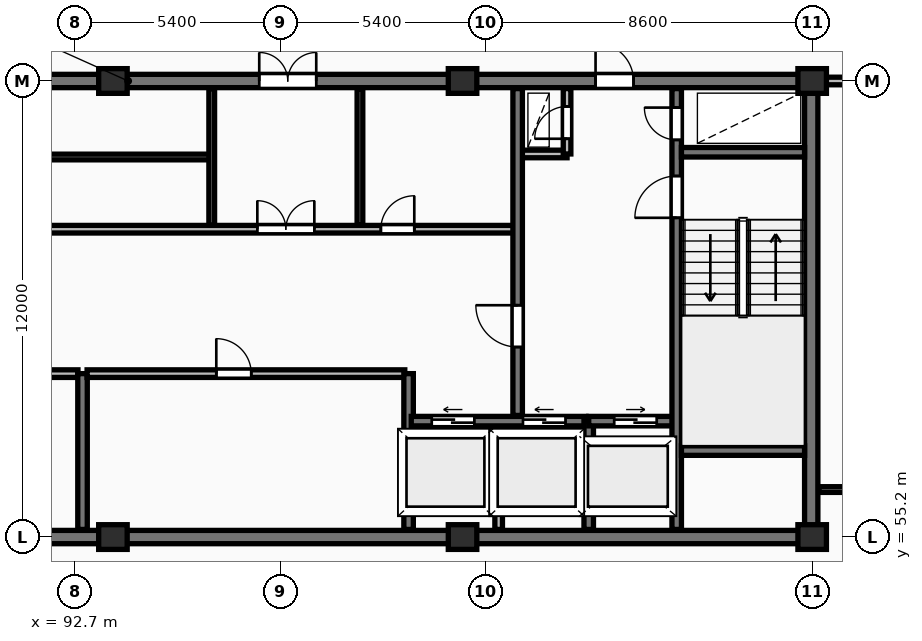
"""IFC4 building model, lengths in metres.
Left out: names, types, materials, properties, quantities, classifications, styles, units other than length and angle.
Written with IfcOpenShell. Run it as: python <this file> out.ifc"""

import sys

from ifc_helpers import new_model, si_unit, direction, frame, frame_2d, origin, origin_2d, place, context, subcontext, project, spatial, rectangle, extrude, element, fill, save


model = new_model("IFC4")
c1 = context("Model", 3, precision=1e-05, world=origin(), true_north=direction((0.0, 1.0)))
c2 = subcontext(c1, "Body", "Model", "MODEL_VIEW")
j1 = project(units=[si_unit("LENGTHUNIT", "METRE"), si_unit("PLANEANGLEUNIT", "RADIAN")], contexts=[c1])
p1 = place(None, origin())
s1 = spatial("IfcSite", under=j1, at=p1, CompositionType="ELEMENT")
p2 = place(p1, origin())
s2 = spatial("IfcBuilding", under=s1, at=p2, CompositionType="ELEMENT")
p3 = place(p2, frame((0.0, 0.0, 256.25)))
s3 = spatial("IfcBuildingStorey", under=s2, at=p3, CompositionType="ELEMENT", Elevation=256.25)
for number, where, z_axis, x_axis in (
    (1, (93.7, 55.2, 0.0), (0.0, 0.0, 1.0), (1.0, 0.0, 0.0)),
    (2, (93.7, 67.2, 0.0), (0.0, 0.0, 1.0), (1.0, 0.0, 0.0)),
    (3, (102.9, 55.2, 0.0), (0.0, 0.0, 1.0), (1.0, 0.0, 0.0)),
    (4, (102.9, 67.2, 0.0), (0.0, 0.0, 1.0), (1.0, 0.0, 0.0)),
    (5, (112.1, 55.2, 0.0), (0.0, 0.0, 1.0), (1.0, 0.0, 0.0)),
    (6, (112.1, 67.2, 0.0), (0.0, 0.0, 1.0), (1.0, 0.0, 0.0)),
):
    element("IfcColumn", number, at=place(p3, frame(where, z_axis=z_axis, x_axis=x_axis)), inside=s3, PredefinedType="COLUMN", context=c2, shape_type="SweptSolid", body=[
        extrude(rectangle(XDim=0.75, YDim=0.65, at=origin_2d()), origin(), (0.0, 0.0, 1.0), 3.45),
    ])
p4 = place(p3, frame((75.95, 55.2, 0.0), z_axis=(0.0, 0.0, 1.0), x_axis=(1.0, 0.0, 0.0)))
e7 = element("IfcWall", 7, at=p4, inside=s3, PredefinedType="SHEAR", context=c2, shape_type="SweptSolid", body=[
    extrude(rectangle(XDim=36.3, YDim=0.35, at=frame_2d((18.15, 0.0))), origin(), (0.0, 0.0, 1.0), 3.45),
])
p5 = place(p3, frame((112.075, 55.375, 0.0), z_axis=(0.0, 0.0, 1.0), x_axis=(0.0, 1.0, 0.0)))
e8 = element("IfcWall", 8, at=p5, inside=s3, PredefinedType="SHEAR", context=c2, shape_type="SweptSolid", body=[
    extrude(rectangle(XDim=11.65, YDim=0.35, at=frame_2d((5.825, 0.0))), origin(), (0.0, 0.0, 1.0), 3.45),
])
p6 = place(p3, frame((75.95, 67.2, 0.0), z_axis=(0.0, 0.0, 1.0), x_axis=(1.0, 0.0, 0.0)))
e9 = element("IfcWall", 9, at=p6, inside=s3, PredefinedType="SHEAR", context=c2, shape_type="SweptSolid", body=[
    extrude(rectangle(XDim=36.3, YDim=0.35, at=frame_2d((18.15, 0.0))), origin(), (0.0, 0.0, 1.0), 3.45),
])
p7 = place(p6, frame((5.25, 0.0, 0.0)))
e10 = element("IfcOpeningElement", 10, at=p7, cuts=e9, PredefinedType="OPENING", context=c2, shape_type="SweptSolid", body=[
    extrude(rectangle(XDim=1.0, YDim=2.15, at=frame_2d((0.5, 1.075))), frame((0.0, 0.185, 0.0), z_axis=(0.0, -1.0, 0.0), x_axis=(1.0, 0.0, 0.0)), (0.0, 0.0, 1.0), 0.37),
])
p8 = place(p6, frame((21.6, 0.0, 0.0)))
e11 = element("IfcOpeningElement", 11, at=p8, cuts=e9, PredefinedType="OPENING", context=c2, shape_type="SweptSolid", body=[
    extrude(rectangle(XDim=1.5, YDim=2.2, at=frame_2d((0.75, 1.1))), frame((0.0, 0.185, 0.0), z_axis=(0.0, -1.0, 0.0), x_axis=(1.0, 0.0, 0.0)), (0.0, 0.0, 1.0), 0.37),
])
p9 = place(p6, frame((30.45, 0.0, 0.0)))
e12 = element("IfcOpeningElement", 12, at=p9, cuts=e9, PredefinedType="OPENING", context=c2, shape_type="SweptSolid", body=[
    extrude(rectangle(XDim=1.0, YDim=2.15, at=frame_2d((0.5, 1.075))), frame((0.0, 0.185, 0.0), z_axis=(0.0, -1.0, 0.0), x_axis=(1.0, 0.0, 0.0)), (0.0, 0.0, 1.0), 0.37),
])
p10 = place(p3, frame((84.42, 59.5, 0.0), z_axis=(0.0, 0.0, 1.0), x_axis=(1.0, 0.0, 0.0)))
e13 = element("IfcWall", 13, at=p10, inside=s3, PredefinedType="PARTITIONING", context=c2, shape_type="SweptSolid", body=[
    extrude(rectangle(XDim=8.36, YDim=0.2, at=frame_2d((4.18, 0.0))), origin(), (0.0, 0.0, 1.0), 3.17),
])
p11 = place(p10, frame((3.4, 0.0, 0.0)))
e14 = element("IfcOpeningElement", 14, at=p11, cuts=e13, PredefinedType="OPENING", context=c2, shape_type="SweptSolid", body=[
    extrude(rectangle(XDim=0.92, YDim=2.08, at=frame_2d((0.46, 1.04))), frame((0.0, 0.11, 0.0), z_axis=(0.0, -1.0, 0.0), x_axis=(1.0, 0.0, 0.0)), (0.0, 0.0, 1.0), 0.22),
])
p12 = place(p3, frame((92.9, 55.4, 0.0), z_axis=(0.0, 0.0, 1.0), x_axis=(0.0, 1.0, 0.0)))
e15 = element("IfcWall", 15, at=p12, inside=s3, PredefinedType="SHEAR", context=c2, shape_type="SweptSolid", body=[
    extrude(rectangle(XDim=4.1, YDim=0.25, at=frame_2d((2.05, 0.0))), origin(), (0.0, 0.0, 1.0), 3.45),
])
p13 = place(p3, frame((93.02, 59.5, 0.0), z_axis=(0.0, 0.0, 1.0), x_axis=(1.0, 0.0, 0.0)))
e16 = element("IfcWall", 16, at=p13, inside=s3, PredefinedType="PARTITIONING", context=c2, shape_type="SweptSolid", body=[
    extrude(rectangle(XDim=8.36, YDim=0.2, at=frame_2d((4.18, 0.0))), origin(), (0.0, 0.0, 1.0), 3.17),
])
p14 = place(p13, frame((3.4, 0.0, 0.0)))
e17 = element("IfcOpeningElement", 17, at=p14, cuts=e16, PredefinedType="OPENING", context=c2, shape_type="SweptSolid", body=[
    extrude(rectangle(XDim=0.92, YDim=2.08, at=frame_2d((0.46, 1.04))), frame((0.0, 0.11, 0.0), z_axis=(0.0, -1.0, 0.0), x_axis=(1.0, 0.0, 0.0)), (0.0, 0.0, 1.0), 0.22),
])
p15 = place(p3, frame((101.48, 55.4, 0.0), z_axis=(0.0, 0.0, 1.0), x_axis=(0.0, 1.0, 0.0)))
e18 = element("IfcWall", 18, at=p15, inside=s3, PredefinedType="SHEAR", context=c2, shape_type="SweptSolid", body=[
    extrude(rectangle(XDim=4.1, YDim=0.25, at=frame_2d((2.05, 0.0))), origin(), (0.0, 0.0, 1.0), 3.45),
])
p16 = place(p3, frame((103.85, 55.4, 0.0), z_axis=(0.0, 0.0, 1.0), x_axis=(0.0, 1.0, 0.0)))
e19 = element("IfcWall", 19, at=p16, inside=s3, PredefinedType="PARTITIONING", context=c2, shape_type="SweptSolid", body=[
    extrude(rectangle(XDim=2.72, YDim=0.2, at=frame_2d((1.36, 0.0))), origin(), (0.0, 0.0, 1.0), 3.17),
])
p17 = place(p3, frame((101.55, 58.25, 0.0), z_axis=(0.0, 0.0, 1.0), x_axis=(1.0, 0.0, 0.0)))
e20 = element("IfcWall", 20, at=p17, inside=s3, PredefinedType="SHEAR", context=c2, shape_type="SweptSolid", body=[
    extrude(rectangle(XDim=4.6, YDim=0.25, at=frame_2d((2.3, 0.0))), origin(), (0.0, 0.0, 1.0), 3.45),
])
p18 = place(p17, frame((0.54, 0.0, 0.0)))
e21 = element("IfcOpeningElement", 21, at=p18, cuts=e20, PredefinedType="OPENING", context=c2, shape_type="SweptSolid", body=[
    extrude(rectangle(XDim=1.12, YDim=2.12, at=frame_2d((0.56, 1.06))), frame((0.0, 0.135, 0.0), z_axis=(0.0, -1.0, 0.0), x_axis=(1.0, 0.0, 0.0)), (0.0, 0.0, 1.0), 0.27),
])
p19 = place(p17, frame((2.94, 0.0, 0.0)))
e22 = element("IfcOpeningElement", 22, at=p19, cuts=e20, PredefinedType="OPENING", context=c2, shape_type="SweptSolid", body=[
    extrude(rectangle(XDim=1.12, YDim=2.12, at=frame_2d((0.56, 1.06))), frame((0.0, 0.135, 0.0), z_axis=(0.0, -1.0, 0.0), x_axis=(1.0, 0.0, 0.0)), (0.0, 0.0, 1.0), 0.27),
])
p20 = place(p3, frame((106.22, 55.4, 0.0), z_axis=(0.0, 0.0, 1.0), x_axis=(0.0, 1.0, 0.0)))
e23 = element("IfcWall", 23, at=p20, inside=s3, PredefinedType="SHEAR", context=c2, shape_type="SweptSolid", body=[
    extrude(rectangle(XDim=2.85, YDim=0.25, at=frame_2d((1.425, 0.0))), origin(), (0.0, 0.0, 1.0), 3.45),
])
p21 = place(p3, frame((106.22, 58.25, 0.0), z_axis=(0.0, 0.0, 1.0), x_axis=(1.0, 0.0, 0.0)))
e24 = element("IfcWall", 24, at=p21, inside=s3, PredefinedType="SHEAR", context=c2, shape_type="SweptSolid", body=[
    extrude(rectangle(XDim=2.46, YDim=0.25, at=frame_2d((1.23, 0.0))), origin(), (0.0, 0.0, 1.0), 3.45),
])
p22 = place(p21, frame((0.67, 0.0, 0.0)))
e25 = element("IfcOpeningElement", 25, at=p22, cuts=e24, PredefinedType="OPENING", context=c2, shape_type="SweptSolid", body=[
    extrude(rectangle(XDim=1.12, YDim=2.12, at=frame_2d((0.56, 1.06))), frame((0.0, 0.135, 0.0), z_axis=(0.0, -1.0, 0.0), x_axis=(1.0, 0.0, 0.0)), (0.0, 0.0, 1.0), 0.27),
])
p23 = place(p3, frame((89.25, 65.2, 0.0), z_axis=(0.0, 0.0, 1.0), x_axis=(1.0, 0.0, 0.0)))
e26 = element("IfcWall", 26, at=p23, inside=s3, PredefinedType="PARTITIONING", context=c2, shape_type="SweptSolid", body=[
    extrude(rectangle(XDim=7.05, YDim=0.15, at=frame_2d((3.525, 0.0))), origin(), (0.0, 0.0, 1.0), 3.17),
])
p24 = place(p23, frame((1.6, 0.0, 0.0)))
e27 = element("IfcOpeningElement", 27, at=p24, cuts=e26, PredefinedType="OPENING", context=c2, shape_type="SweptSolid", body=[
    extrude(rectangle(XDim=0.88, YDim=2.06, at=frame_2d((0.44, 1.03))), frame((0.0, 0.085, 0.0), z_axis=(0.0, -1.0, 0.0), x_axis=(1.0, 0.0, 0.0)), (0.0, 0.0, 1.0), 0.17),
])
for number, where, z_axis, x_axis in (
    (28, (96.3, 63.4, 0.0), (0.0, 0.0, 1.0), (0.0, 1.0, 0.0)),
    (29, (100.2, 63.4, 0.0), (0.0, 0.0, 1.0), (0.0, 1.0, 0.0)),
):
    element("IfcWall", number, at=place(p3, frame(where, z_axis=z_axis, x_axis=x_axis)), inside=s3, PredefinedType="PARTITIONING", context=c2, shape_type="SweptSolid", body=[
        extrude(rectangle(XDim=3.6, YDim=0.15, at=frame_2d((1.8, 0.0))), origin(), (0.0, 0.0, 1.0), 3.17),
    ])
p25 = place(p3, frame((84.42, 63.3, 0.0), z_axis=(0.0, 0.0, 1.0), x_axis=(1.0, 0.0, 0.0)))
e30 = element("IfcWall", 30, at=p25, inside=s3, PredefinedType="PARTITIONING", context=c2, shape_type="SweptSolid", body=[
    extrude(rectangle(XDim=19.83, YDim=0.2, at=frame_2d((9.915, 0.0))), origin(), (0.0, 0.0, 1.0), 3.17),
])
p26 = place(p25, frame((1.15, 0.0, 0.0)))
e31 = element("IfcOpeningElement", 31, at=p26, cuts=e30, PredefinedType="OPENING", context=c2, shape_type="SweptSolid", body=[
    extrude(rectangle(XDim=0.85, YDim=2.05, at=frame_2d((0.425, 1.025))), frame((0.0, 0.11, 0.0), z_axis=(0.0, -1.0, 0.0), x_axis=(1.0, 0.0, 0.0)), (0.0, 0.0, 1.0), 0.22),
])
p27 = place(p25, frame((3.25, 0.0, 0.0)))
e32 = element("IfcOpeningElement", 32, at=p27, cuts=e30, PredefinedType="OPENING", context=c2, shape_type="SweptSolid", body=[
    extrude(rectangle(XDim=0.85, YDim=2.05, at=frame_2d((0.425, 1.025))), frame((0.0, 0.11, 0.0), z_axis=(0.0, -1.0, 0.0), x_axis=(1.0, 0.0, 0.0)), (0.0, 0.0, 1.0), 0.22),
])
p28 = place(p25, frame((13.08, 0.0, 0.0)))
e33 = element("IfcOpeningElement", 33, at=p28, cuts=e30, PredefinedType="OPENING", context=c2, shape_type="SweptSolid", body=[
    extrude(rectangle(XDim=1.5, YDim=2.2, at=frame_2d((0.75, 1.1))), frame((0.0, 0.11, 0.0), z_axis=(0.0, -1.0, 0.0), x_axis=(1.0, 0.0, 0.0)), (0.0, 0.0, 1.0), 0.22),
])
p29 = place(p25, frame((6.68, 0.0, 0.0)))
e34 = element("IfcOpeningElement", 34, at=p29, cuts=e30, PredefinedType="OPENING", context=c2, shape_type="SweptSolid", body=[
    extrude(rectangle(XDim=0.92, YDim=2.08, at=frame_2d((0.46, 1.04))), frame((0.0, 0.11, 0.0), z_axis=(0.0, -1.0, 0.0), x_axis=(1.0, 0.0, 0.0)), (0.0, 0.0, 1.0), 0.22),
])
p30 = place(p25, frame((16.33, 0.0, 0.0)))
e35 = element("IfcOpeningElement", 35, at=p30, cuts=e30, PredefinedType="OPENING", context=c2, shape_type="SweptSolid", body=[
    extrude(rectangle(XDim=0.88, YDim=2.06, at=frame_2d((0.44, 1.03))), frame((0.0, 0.11, 0.0), z_axis=(0.0, -1.0, 0.0), x_axis=(1.0, 0.0, 0.0)), (0.0, 0.0, 1.0), 0.22),
])
p31 = place(p3, frame((104.45, 65.28, 0.0), z_axis=(0.0, 0.0, 1.0), x_axis=(1.0, 0.0, 0.0)))
e36 = element("IfcWall", 36, at=p31, inside=s3, PredefinedType="PARTITIONING", context=c2, shape_type="SweptSolid", body=[
    extrude(rectangle(XDim=1.2, YDim=0.2, at=frame_2d((0.6, 0.0))), origin(), (0.0, 0.0, 1.0), 3.17),
])
p32 = place(p3, frame((105.65, 65.28, 0.0), z_axis=(0.0, 0.0, 1.0), x_axis=(0.0, 1.0, 0.0)))
e37 = element("IfcWall", 37, at=p32, inside=s3, PredefinedType="PARTITIONING", context=c2, shape_type="SweptSolid", body=[
    extrude(rectangle(XDim=1.72, YDim=0.2, at=frame_2d((0.86, 0.0))), origin(), (0.0, 0.0, 1.0), 3.17),
])
p33 = place(p32, frame((0.4, 0.0, 0.0)))
e38 = element("IfcOpeningElement", 38, at=p33, cuts=e37, PredefinedType="OPENING", context=c2, shape_type="SweptSolid", body=[
    extrude(rectangle(XDim=0.85, YDim=2.05, at=frame_2d((0.425, 1.025))), frame((0.0, 0.11, 0.0), z_axis=(0.0, -1.0, 0.0), x_axis=(1.0, 0.0, 0.0)), (0.0, 0.0, 1.0), 0.22),
])
p34 = place(p3, frame((104.35, 58.4, 0.0), z_axis=(0.0, 0.0, 1.0), x_axis=(0.0, 1.0, 0.0)))
e39 = element("IfcWall", 39, at=p34, inside=s3, PredefinedType="SHEAR", context=c2, shape_type="SweptSolid", body=[
    extrude(rectangle(XDim=8.6, YDim=0.25, at=frame_2d((4.3, 0.0))), origin(), (0.0, 0.0, 1.0), 3.45),
])
p35 = place(p34, frame((1.8, 0.0, 0.0)))
e40 = element("IfcOpeningElement", 40, at=p35, cuts=e39, PredefinedType="OPENING", context=c2, shape_type="SweptSolid", body=[
    extrude(rectangle(XDim=1.1, YDim=2.1, at=frame_2d((0.55, 1.05))), frame((0.0, 0.135, 0.0), z_axis=(0.0, -1.0, 0.0), x_axis=(1.0, 0.0, 0.0)), (0.0, 0.0, 1.0), 0.27),
])
p36 = place(p3, frame((108.535, 55.4, 0.0), z_axis=(0.0, 0.0, 1.0), x_axis=(0.0, 1.0, 0.0)))
e41 = element("IfcWall", 41, at=p36, inside=s3, PredefinedType="SHEAR", context=c2, shape_type="SweptSolid", body=[
    extrude(rectangle(XDim=11.6, YDim=0.25, at=frame_2d((5.8, 0.0))), origin(), (0.0, 0.0, 1.0), 3.45),
])
p37 = place(p36, frame((8.2, 0.0, 0.0)))
e42 = element("IfcOpeningElement", 42, at=p37, cuts=e41, PredefinedType="OPENING", context=c2, shape_type="SweptSolid", body=[
    extrude(rectangle(XDim=1.1, YDim=2.1, at=frame_2d((0.55, 1.05))), frame((0.0, 0.135, 0.0), z_axis=(0.0, -1.0, 0.0), x_axis=(1.0, 0.0, 0.0)), (0.0, 0.0, 1.0), 0.27),
])
p38 = place(p36, frame((10.25, 0.0, 0.0)))
e43 = element("IfcOpeningElement", 43, at=p38, cuts=e41, PredefinedType="OPENING", context=c2, shape_type="SweptSolid", body=[
    extrude(rectangle(XDim=0.85, YDim=2.05, at=frame_2d((0.425, 1.025))), frame((0.0, 0.135, 0.0), z_axis=(0.0, -1.0, 0.0), x_axis=(1.0, 0.0, 0.0)), (0.0, 0.0, 1.0), 0.27),
])
for number, where, z_axis, x_axis in (
    (44, (108.66, 57.475, 0.0), (0.0, 0.0, 1.0), (1.0, 0.0, 0.0)),
    (45, (108.66, 65.325, 0.0), (0.0, 0.0, 1.0), (1.0, 0.0, 0.0)),
):
    element("IfcWall", number, at=place(p3, frame(where, z_axis=z_axis, x_axis=x_axis)), inside=s3, PredefinedType="SHEAR", context=c2, shape_type="SweptSolid", body=[
        extrude(rectangle(XDim=3.24, YDim=0.25, at=frame_2d((1.62, 0.0))), origin(), (0.0, 0.0, 1.0), 3.45),
    ])
p39 = place(p3, frame((112.27, 56.45, 0.0), z_axis=(0.0, 0.0, 1.0), x_axis=(1.0, 0.0, 0.0)))
e46 = element("IfcWall", 46, at=p39, inside=s3, PredefinedType="PARTITIONING", context=c2, shape_type="SweptSolid", body=[
    extrude(rectangle(XDim=6.76, YDim=0.15, at=frame_2d((3.38, 0.0))), origin(), (0.0, 0.0, 1.0), 3.17),
])
p40 = place(p39, frame((1.64, 0.0, 0.0)))
e47 = element("IfcOpeningElement", 47, at=p40, cuts=e46, PredefinedType="OPENING", context=c2, shape_type="SweptSolid", body=[
    extrude(rectangle(XDim=0.84, YDim=2.04, at=frame_2d((0.42, 1.02))), frame((0.0, 0.085, 0.0), z_axis=(0.0, -1.0, 0.0), x_axis=(1.0, 0.0, 0.0)), (0.0, 0.0, 1.0), 0.17),
])
p41 = place(p39, frame((3.16, 0.0, 0.0)))
e48 = element("IfcOpeningElement", 48, at=p41, cuts=e46, PredefinedType="OPENING", context=c2, shape_type="SweptSolid", body=[
    extrude(rectangle(XDim=0.88, YDim=2.06, at=frame_2d((0.44, 1.03))), frame((0.0, 0.085, 0.0), z_axis=(0.0, -1.0, 0.0), x_axis=(1.0, 0.0, 0.0)), (0.0, 0.0, 1.0), 0.17),
])
p42 = place(p3, frame((112.25, 67.2, 0.0), z_axis=(0.0, 0.0, 1.0), x_axis=(1.0, 0.0, 0.0)))
e49 = element("IfcWall", 49, at=p42, inside=s3, PredefinedType="PARTITIONING", context=c2, shape_type="SweptSolid", body=[
    extrude(rectangle(XDim=16.15, YDim=0.2, at=frame_2d((8.075, 0.0))), origin(), (0.0, 0.0, 1.0), 2.633),
])
p43 = place(p42, frame((1.58, 0.0, 0.0)))
e50 = element("IfcOpeningElement", 50, at=p43, cuts=e49, PredefinedType="OPENING", context=c2, shape_type="SweptSolid", body=[
    extrude(rectangle(XDim=0.95, YDim=2.15, at=frame_2d((0.475, 1.075))), frame((0.0, 0.11, 0.0), z_axis=(0.0, -1.0, 0.0), x_axis=(1.0, 0.0, 0.0)), (0.0, 0.0, 1.0), 0.22),
])
p44 = place(p8, origin())
e51 = element("IfcDoor", 51, at=p44, inside=s3, OperationType="DOUBLE_DOOR_SINGLE_SWING", PredefinedType="DOOR", context=c2, shape_type="SweptSolid", body=[
    extrude(rectangle(XDim=1.5, YDim=2.2, at=frame_2d((0.75, 1.1))), frame((0.0, 0.025, 0.0), z_axis=(0.0, -1.0, 0.0), x_axis=(1.0, 0.0, 0.0)), (0.0, 0.0, 1.0), 0.05),
])
fill(e11, e51)
p45 = place(p9, origin())
e52 = element("IfcDoor", 52, at=p45, inside=s3, OperationType="SINGLE_SWING_LEFT", PredefinedType="DOOR", context=c2, shape_type="SweptSolid", body=[
    extrude(rectangle(XDim=1.0, YDim=2.15, at=frame_2d((0.5, 1.075))), frame((0.0, 0.025, 0.0), z_axis=(0.0, -1.0, 0.0), x_axis=(1.0, 0.0, 0.0)), (0.0, 0.0, 1.0), 0.05),
])
fill(e12, e52)
p46 = place(p14, origin())
e53 = element("IfcDoor", 53, at=p46, inside=s3, OperationType="SINGLE_SWING_LEFT", PredefinedType="DOOR", context=c2, shape_type="SweptSolid", body=[
    extrude(rectangle(XDim=0.92, YDim=2.08, at=frame_2d((0.46, 1.04))), frame((0.0, 0.025, 0.0), z_axis=(0.0, -1.0, 0.0), x_axis=(1.0, 0.0, 0.0)), (0.0, 0.0, 1.0), 0.05),
])
fill(e17, e53)
p47 = place(p18, origin())
e54 = element("IfcDoor", 54, at=p47, inside=s3, OperationType="SLIDING_TO_LEFT", PredefinedType="DOOR", context=c2, shape_type="SweptSolid", body=[
    extrude(rectangle(XDim=1.12, YDim=2.12, at=frame_2d((0.56, 1.06))), frame((0.0, 0.025, 0.0), z_axis=(0.0, -1.0, 0.0), x_axis=(1.0, 0.0, 0.0)), (0.0, 0.0, 1.0), 0.05),
])
fill(e21, e54)
p48 = place(p19, origin())
e55 = element("IfcDoor", 55, at=p48, inside=s3, OperationType="SLIDING_TO_LEFT", PredefinedType="DOOR", context=c2, shape_type="SweptSolid", body=[
    extrude(rectangle(XDim=1.12, YDim=2.12, at=frame_2d((0.56, 1.06))), frame((0.0, 0.025, 0.0), z_axis=(0.0, -1.0, 0.0), x_axis=(1.0, 0.0, 0.0)), (0.0, 0.0, 1.0), 0.05),
])
fill(e22, e55)
p49 = place(p22, origin())
e56 = element("IfcDoor", 56, at=p49, inside=s3, OperationType="SLIDING_TO_RIGHT", PredefinedType="DOOR", context=c2, shape_type="SweptSolid", body=[
    extrude(rectangle(XDim=1.12, YDim=2.12, at=frame_2d((0.56, 1.06))), frame((0.0, 0.025, 0.0), z_axis=(0.0, -1.0, 0.0), x_axis=(1.0, 0.0, 0.0)), (0.0, 0.0, 1.0), 0.05),
])
fill(e25, e56)
p50 = place(p28, origin())
e57 = element("IfcDoor", 57, at=p50, inside=s3, OperationType="DOUBLE_DOOR_SINGLE_SWING", PredefinedType="DOOR", context=c2, shape_type="SweptSolid", body=[
    extrude(rectangle(XDim=1.5, YDim=2.2, at=frame_2d((0.75, 1.1))), frame((0.0, 0.025, 0.0), z_axis=(0.0, -1.0, 0.0), x_axis=(1.0, 0.0, 0.0)), (0.0, 0.0, 1.0), 0.05),
])
fill(e33, e57)
p51 = place(p30, origin())
e58 = element("IfcDoor", 58, at=p51, inside=s3, OperationType="SINGLE_SWING_RIGHT", PredefinedType="DOOR", context=c2, shape_type="SweptSolid", body=[
    extrude(rectangle(XDim=0.88, YDim=2.06, at=frame_2d((0.44, 1.03))), frame((0.0, 0.025, 0.0), z_axis=(0.0, -1.0, 0.0), x_axis=(1.0, 0.0, 0.0)), (0.0, 0.0, 1.0), 0.05),
])
fill(e35, e58)
p52 = place(p33, origin())
e59 = element("IfcDoor", 59, at=p52, inside=s3, OperationType="SINGLE_SWING_LEFT", PredefinedType="DOOR", context=c2, shape_type="SweptSolid", body=[
    extrude(rectangle(XDim=0.85, YDim=2.05, at=frame_2d((0.425, 1.025))), frame((0.0, 0.025, 0.0), z_axis=(0.0, -1.0, 0.0), x_axis=(1.0, 0.0, 0.0)), (0.0, 0.0, 1.0), 0.05),
])
fill(e38, e59)
p53 = place(p35, origin())
e60 = element("IfcDoor", 60, at=p53, inside=s3, OperationType="SINGLE_SWING_RIGHT", PredefinedType="DOOR", context=c2, shape_type="SweptSolid", body=[
    extrude(rectangle(XDim=1.1, YDim=2.1, at=frame_2d((0.55, 1.05))), frame((0.0, 0.025, 0.0), z_axis=(0.0, -1.0, 0.0), x_axis=(1.0, 0.0, 0.0)), (0.0, 0.0, 1.0), 0.05),
])
fill(e40, e60)
p54 = place(p37, origin())
e61 = element("IfcDoor", 61, at=p54, inside=s3, OperationType="SINGLE_SWING_LEFT", PredefinedType="DOOR", context=c2, shape_type="SweptSolid", body=[
    extrude(rectangle(XDim=1.1, YDim=2.1, at=frame_2d((0.55, 1.05))), frame((0.0, 0.025, 0.0), z_axis=(0.0, -1.0, 0.0), x_axis=(1.0, 0.0, 0.0)), (0.0, 0.0, 1.0), 0.05),
])
fill(e42, e61)
p55 = place(p38, origin())
e62 = element("IfcDoor", 62, at=p55, inside=s3, OperationType="SINGLE_SWING_RIGHT", PredefinedType="DOOR", context=c2, shape_type="SweptSolid", body=[
    extrude(rectangle(XDim=0.85, YDim=2.05, at=frame_2d((0.425, 1.025))), frame((0.0, 0.025, 0.0), z_axis=(0.0, -1.0, 0.0), x_axis=(1.0, 0.0, 0.0)), (0.0, 0.0, 1.0), 0.05),
])
fill(e43, e62)
save(model, sys.argv[1])
